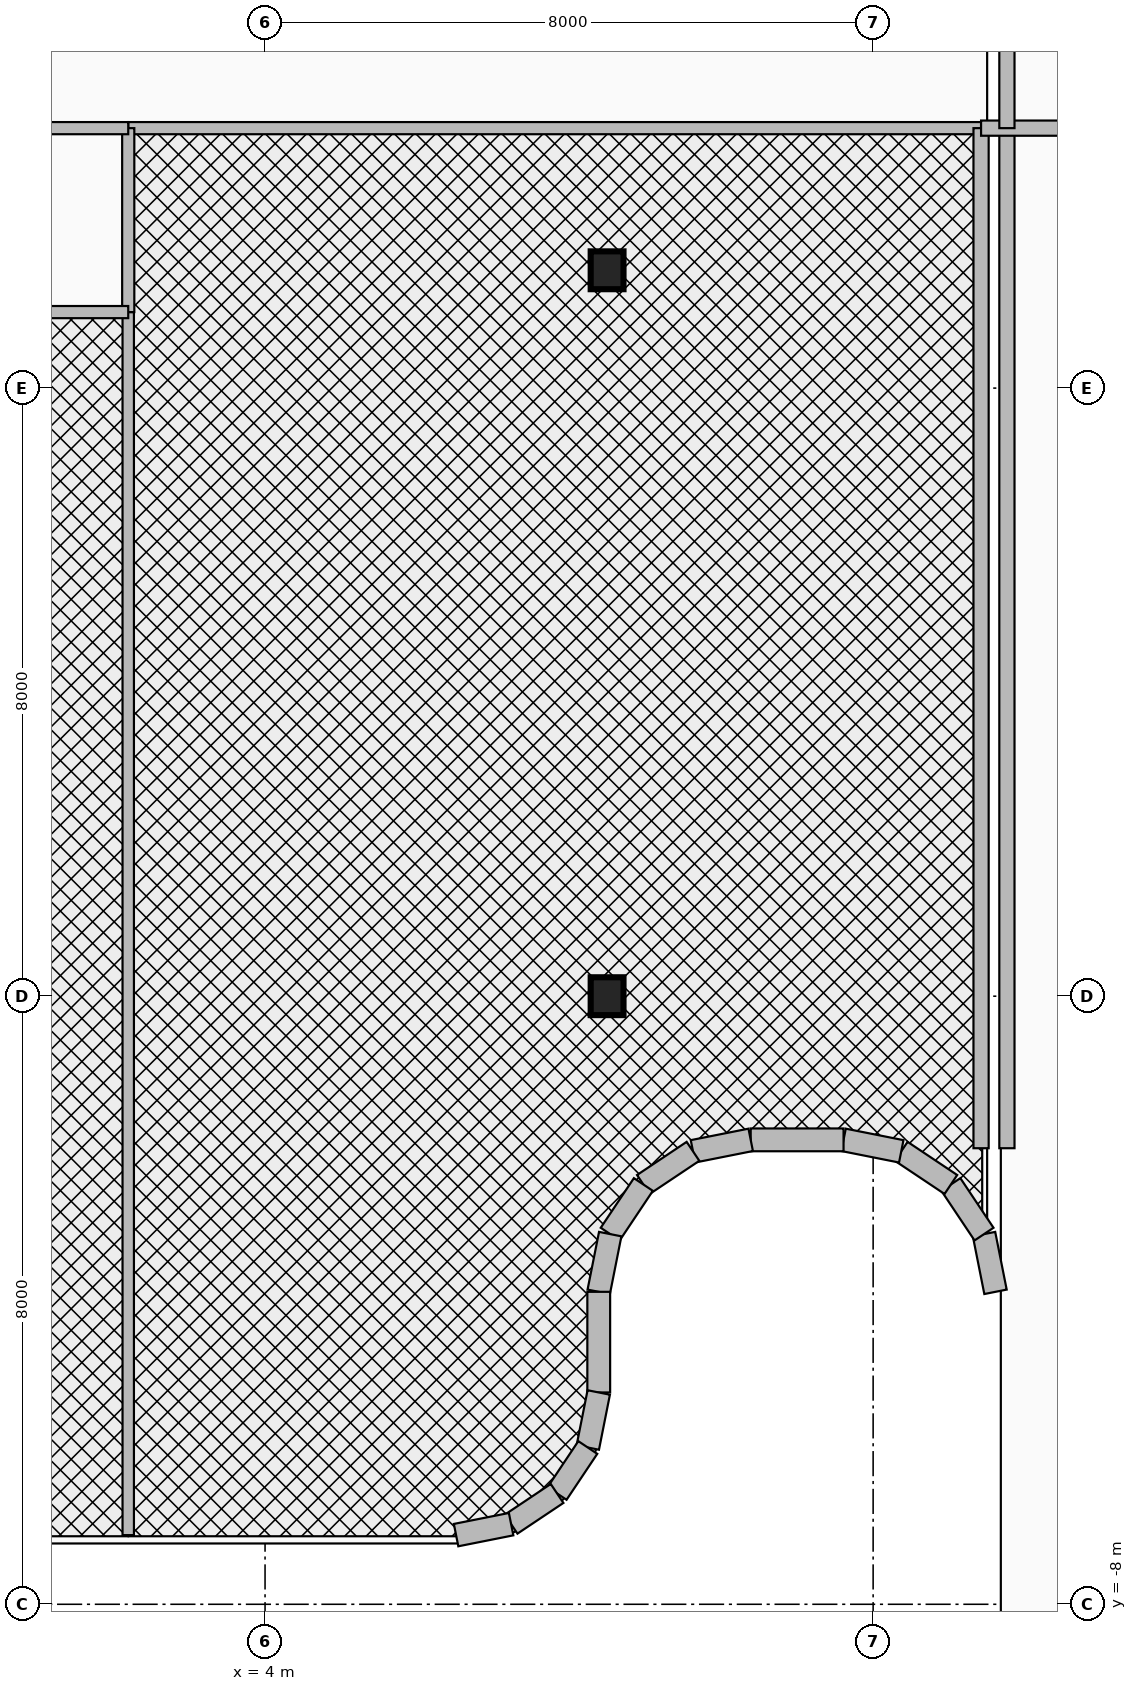
"""IFC4 building model, lengths in metres.
Left out: names, types, materials, properties, quantities, classifications, styles, units other than length and angle.
Written with IfcOpenShell. Run it as: python <this file> out.ifc"""

import sys

from ifc_helpers import new_model, si_unit, direction, frame, frame_2d, origin, origin_2d, place, context, subcontext, project, spatial, rectangle, i_section, extrude, source, transform, mapped, element, fill, save


model = new_model("IFC4")
c1 = context("Model", 3, precision=1e-05, world=origin(), true_north=direction((0.0, 1.0)))
c2 = subcontext(c1, "Body", "Model", "MODEL_VIEW")
j1 = project(units=[si_unit("LENGTHUNIT", "METRE"), si_unit("PLANEANGLEUNIT", "RADIAN")], contexts=[c1])
p1 = place(None, origin())
s1 = spatial("IfcSite", under=j1, at=p1, CompositionType="ELEMENT")
p2 = place(p1, origin())
s2 = spatial("IfcBuilding", under=s1, at=p2, CompositionType="ELEMENT")
p3 = place(p2, frame((0.0, 0.0, 180.5)))
s3 = spatial("IfcBuildingStorey", under=s2, at=p3, CompositionType="ELEMENT", Elevation=180.5)
m1 = source(origin(), c2, "Body", "SweptSolid", [
    extrude(i_section(OverallWidth=0.432, OverallDepth=0.498, WebThickness=0.056, FlangeThickness=0.089, at=origin_2d()), origin(), (0.0, 0.0, 1.0), 3.95),
])
for number, where, z_axis, x_axis in (
    (1, (8.5, 0.0, 0.0), (0.0, 0.0, 1.0), (1.0, 0.0, 0.0)),
    (2, (8.5, 9.55, 0.0), (0.0, 0.0, 1.0), (1.0, 0.0, 0.0)),
):
    element("IfcColumn", number, at=place(p3, frame(where, z_axis=z_axis, x_axis=x_axis)), inside=s3, PredefinedType="COLUMN", context=c2, shape_type="MappedRepresentation", body=[
        mapped(m1, transform((0.0, 0.0, 0.0), x_axis=(1.0, 0.0, 0.0), y_axis=(0.0, 1.0, 0.0), z_axis=(0.0, 0.0, 1.0), scale=1.0)),
    ])
p4 = place(p3, frame((13.61, -3.889, 0.0), z_axis=(0.0, 0.0, 1.0), x_axis=(-0.195206365311, 0.98076219082, 0.0)))
e3 = element("IfcWall", 3, at=p4, inside=s3, PredefinedType="SOLIDWALL", context=c2, shape_type="SweptSolid", body=[
    extrude(rectangle(XDim=0.774, YDim=0.3, at=frame_2d((0.387, 0.0))), origin(), (0.0, 0.0, 1.0), 3.63),
])
for number, where, z_axis, x_axis in (
    (4, (13.459, -3.13, 0.0), (0.0, 0.0, 1.0), (-0.556, 0.831, 0.0)),
    (5, (13.023, -2.477, 0.0), (0.0, 0.0, 1.0), (-0.831, 0.556, 0.0)),
):
    element("IfcWall", number, at=place(p3, frame(where, z_axis=z_axis, x_axis=x_axis)), inside=s3, PredefinedType="SOLIDWALL", context=c2, shape_type="SweptSolid", body=[
        extrude(rectangle(XDim=0.785, YDim=0.3, at=frame_2d((0.393, 0.0))), origin(), (0.0, 0.0, 1.0), 3.63),
    ])
p5 = place(p3, frame((12.37, -2.041, 0.0), z_axis=(0.0, 0.0, 1.0), x_axis=(-0.98076219082, 0.195206365311, 0.0)))
e6 = element("IfcWall", 6, at=p5, inside=s3, PredefinedType="SOLIDWALL", context=c2, shape_type="SweptSolid", body=[
    extrude(rectangle(XDim=0.774, YDim=0.3, at=frame_2d((0.387, 0.0))), origin(), (0.0, 0.0, 1.0), 3.63),
])
p6 = place(p3, frame((11.611, -1.89, 0.0), z_axis=(0.0, 0.0, 1.0), x_axis=(-1.0, 0.0, 0.0)))
e7 = element("IfcWall", 7, at=p6, inside=s3, PredefinedType="SOLIDWALL", context=c2, shape_type="SweptSolid", body=[
    extrude(rectangle(XDim=1.222, YDim=0.3, at=frame_2d((0.611, 0.0))), origin(), (0.0, 0.0, 1.0), 3.63),
])
p7 = place(p3, frame((10.389, -1.89, 0.0), z_axis=(0.0, 0.0, 1.0), x_axis=(-0.98076219082, -0.195206365311, 0.0)))
e8 = element("IfcWall", 8, at=p7, inside=s3, PredefinedType="SOLIDWALL", context=c2, shape_type="SweptSolid", body=[
    extrude(rectangle(XDim=0.774, YDim=0.3, at=frame_2d((0.387, 0.0))), origin(), (0.0, 0.0, 1.0), 3.63),
])
for number, where, z_axis, x_axis in (
    (9, (9.63, -2.041, 0.0), (0.0, 0.0, 1.0), (-0.831, -0.556, 0.0)),
    (10, (8.977, -2.477, 0.0), (0.0, 0.0, 1.0), (-0.556, -0.831, 0.0)),
):
    element("IfcWall", number, at=place(p3, frame(where, z_axis=z_axis, x_axis=x_axis)), inside=s3, PredefinedType="SOLIDWALL", context=c2, shape_type="SweptSolid", body=[
        extrude(rectangle(XDim=0.785, YDim=0.3, at=frame_2d((0.393, 0.0))), origin(), (0.0, 0.0, 1.0), 2.615),
    ])
p8 = place(p3, frame((8.541, -3.13, 0.0), z_axis=(0.0, 0.0, 1.0), x_axis=(-0.195206365311, -0.98076219082, 0.0)))
e11 = element("IfcWall", 11, at=p8, inside=s3, PredefinedType="SOLIDWALL", context=c2, shape_type="SweptSolid", body=[
    extrude(rectangle(XDim=0.774, YDim=0.3, at=frame_2d((0.387, 0.0))), origin(), (0.0, 0.0, 1.0), 2.615),
])
p9 = place(p3, frame((8.39, -3.889, 0.0), z_axis=(0.0, 0.0, 1.0), x_axis=(0.0, -1.0, 0.0)))
e12 = element("IfcWall", 12, at=p9, inside=s3, PredefinedType="SOLIDWALL", context=c2, shape_type="SweptSolid", body=[
    extrude(rectangle(XDim=1.324, YDim=0.3, at=frame_2d((0.662, 0.0))), origin(), (0.0, 0.0, 1.0), 2.615),
])
p10 = place(p3, frame((8.39, -5.213, 0.0), z_axis=(0.0, 0.0, 1.0), x_axis=(-0.194780446724, -0.980846867546, 0.0)))
e13 = element("IfcWall", 13, at=p10, inside=s3, PredefinedType="SOLIDWALL", context=c2, shape_type="SweptSolid", body=[
    extrude(rectangle(XDim=0.738, YDim=0.3, at=frame_2d((0.369, 0.0))), origin(), (0.0, 0.0, 1.0), 2.615),
])
p11 = place(p3, frame((8.246, -5.937, 0.0), z_axis=(0.0, 0.0, 1.0), x_axis=(-0.555784030735, -0.83132671747, 0.0)))
e14 = element("IfcWall", 14, at=p11, inside=s3, PredefinedType="SOLIDWALL", context=c2, shape_type="SweptSolid", body=[
    extrude(rectangle(XDim=0.728, YDim=0.3, at=frame_2d((0.364, 0.0))), origin(), (0.0, 0.0, 1.0), 2.615),
])
p12 = place(p3, frame((7.842, -6.542, 0.0), z_axis=(0.0, 0.0, 1.0), x_axis=(-0.831378135196, -0.555707113792, 0.0)))
e15 = element("IfcWall", 15, at=p12, inside=s3, PredefinedType="SOLIDWALL", context=c2, shape_type="SweptSolid", body=[
    extrude(rectangle(XDim=0.727, YDim=0.3, at=frame_2d((0.364, 0.0))), origin(), (0.0, 0.0, 1.0), 3.63),
])
p13 = place(p3, frame((7.237, -6.946, 0.0), z_axis=(0.0, 0.0, 1.0), x_axis=(-0.980783640462, -0.195098566376, 0.0)))
e16 = element("IfcWall", 16, at=p13, inside=s3, PredefinedType="SOLIDWALL", context=c2, shape_type="SweptSolid", body=[
    extrude(rectangle(XDim=0.738, YDim=0.3, at=frame_2d((0.369, 0.0))), origin(), (0.0, 0.0, 1.0), 3.076),
])
p14 = place(p3, frame((2.2, 11.42, 0.0), z_axis=(0.0, 0.0, 1.0), x_axis=(1.0, 0.0, 0.0)))
e17 = element("IfcWall", 17, at=p14, inside=s3, PredefinedType="PARTITIONING", context=c2, shape_type="SweptSolid", body=[
    extrude(rectangle(XDim=11.22, YDim=0.16, at=frame_2d((5.61, 0.0))), origin(), (0.0, 0.0, 1.0), 2.615),
])
p15 = place(p14, frame((4.0, 0.0, 0.0)))
e18 = element("IfcOpeningElement", 18, at=p15, cuts=e17, PredefinedType="OPENING", context=c2, shape_type="SweptSolid", body=[
    extrude(rectangle(XDim=1.8, YDim=2.15, at=frame_2d((0.9, 1.075))), frame((0.0, 0.095, 0.0), z_axis=(0.0, -1.0, 0.0), x_axis=(1.0, 0.0, 0.0)), (0.0, 0.0, 1.0), 0.19),
])
for number, where, z_axis, x_axis in (
    (19, (13.42, -2.0, 0.0), (0.0, 0.0, 1.0), (0.0, 1.0, 0.0)),
    (20, (13.76, -2.0, 0.0), (0.0, 0.0, 1.0), (0.0, 1.0, 0.0)),
):
    element("IfcWall", number, at=place(p3, frame(where, z_axis=z_axis, x_axis=x_axis)), inside=s3, PredefinedType="PARTITIONING", context=c2, shape_type="SweptSolid", body=[
        extrude(rectangle(XDim=13.42, YDim=0.2, at=frame_2d((6.71, 0.0))), origin(), (0.0, 0.0, 1.0), 2.665),
    ])
p16 = place(p3, frame((2.2, -7.09, 0.0), z_axis=(0.0, 0.0, 1.0), x_axis=(0.0, 1.0, 0.0)))
e21 = element("IfcWall", 21, at=p16, inside=s3, PredefinedType="PARTITIONING", context=c2, shape_type="SweptSolid", body=[
    extrude(rectangle(XDim=16.09, YDim=0.15, at=frame_2d((8.045, 0.0))), origin(), (0.0, 0.0, 1.0), 2.665),
])
p17 = place(p16, frame((11.5, 0.0, 0.0)))
e22 = element("IfcOpeningElement", 22, at=p17, cuts=e21, PredefinedType="OPENING", context=c2, shape_type="SweptSolid", body=[
    extrude(rectangle(XDim=0.9, YDim=2.1, at=frame_2d((0.45, 1.05))), frame((0.0, 0.09, 0.0), z_axis=(0.0, -1.0, 0.0), x_axis=(1.0, 0.0, 0.0)), (0.0, 0.0, 1.0), 0.18),
])
p18 = place(p3, frame((2.2, 9.0, 0.0), z_axis=(0.0, 0.0, 1.0), x_axis=(0.0, 1.0, 0.0)))
e23 = element("IfcWall", 23, at=p18, inside=s3, PredefinedType="PARTITIONING", context=c2, shape_type="SweptSolid", body=[
    extrude(rectangle(XDim=2.42, YDim=0.16, at=frame_2d((1.21, 0.0))), origin(), (0.0, 0.0, 1.0), 2.665),
])
p19 = place(p3, frame((-2.2, 9.0, 0.0), z_axis=(0.0, 0.0, 1.0), x_axis=(1.0, 0.0, 0.0)))
e24 = element("IfcWall", 24, at=p19, inside=s3, PredefinedType="PARTITIONING", context=c2, shape_type="SweptSolid", body=[
    extrude(rectangle(XDim=4.4, YDim=0.16, at=frame_2d((2.2, 0.0))), origin(), (0.0, 0.0, 1.0), 3.63),
])
p20 = place(p3, frame((-2.2, 11.42, 0.0), z_axis=(0.0, 0.0, 1.0), x_axis=(1.0, 0.0, 0.0)))
e25 = element("IfcWall", 25, at=p20, inside=s3, PredefinedType="PARTITIONING", context=c2, shape_type="SweptSolid", body=[
    extrude(rectangle(XDim=4.4, YDim=0.16, at=frame_2d((2.2, 0.0))), origin(), (0.0, 0.0, 1.0), 3.63),
])
p21 = place(p20, frame((0.3, 0.0, 0.0)))
e26 = element("IfcOpeningElement", 26, at=p21, cuts=e25, PredefinedType="OPENING", context=c2, shape_type="SweptSolid", body=[
    extrude(rectangle(XDim=0.85, YDim=2.1, at=frame_2d((0.425, 1.05))), frame((0.0, 0.095, 0.0), z_axis=(0.0, -1.0, 0.0), x_axis=(1.0, 0.0, 0.0)), (0.0, 0.0, 1.0), 0.19),
])
p22 = place(p20, frame((2.45, 0.0, 0.0)))
e27 = element("IfcOpeningElement", 27, at=p22, cuts=e25, PredefinedType="OPENING", context=c2, shape_type="SweptSolid", body=[
    extrude(rectangle(XDim=0.85, YDim=2.1, at=frame_2d((0.425, 1.05))), frame((0.0, 0.095, 0.0), z_axis=(0.0, -1.0, 0.0), x_axis=(1.0, 0.0, 0.0)), (0.0, 0.0, 1.0), 0.19),
])
p23 = place(p3, frame((13.42, 11.42, 0.0), z_axis=(0.0, 0.0, 1.0), x_axis=(1.0, 0.0, 0.0)))
e28 = element("IfcWall", 28, at=p23, inside=s3, PredefinedType="PARTITIONING", context=c2, shape_type="SweptSolid", body=[
    extrude(rectangle(XDim=1.98, YDim=0.2, at=frame_2d((0.99, 0.0))), origin(), (0.0, 0.0, 1.0), 3.004),
])
p24 = place(p3, frame((13.76, 11.42, 0.0), z_axis=(0.0, 0.0, 1.0), x_axis=(0.0, 1.0, 0.0)))
e29 = element("IfcWall", 29, at=p24, inside=s3, PredefinedType="PARTITIONING", context=c2, shape_type="SweptSolid", body=[
    extrude(rectangle(XDim=1.5, YDim=0.2, at=frame_2d((0.75, 0.0))), origin(), (0.0, 0.0, 1.0), 3.004),
])
p25 = place(p24, frame((0.225, 0.0, 0.0)))
e30 = element("IfcOpeningElement", 30, at=p25, cuts=e29, PredefinedType="OPENING", context=c2, shape_type="SweptSolid", body=[
    extrude(rectangle(XDim=1.05, YDim=2.15, at=frame_2d((0.525, 1.075))), frame((0.0, 0.115, 0.0), z_axis=(0.0, -1.0, 0.0), x_axis=(1.0, 0.0, 0.0)), (0.0, 0.0, 1.0), 0.23),
])
p26 = place(p15, origin())
e31 = element("IfcDoor", 31, at=p26, inside=s3, OperationType="DOUBLE_DOOR_SINGLE_SWING", PredefinedType="DOOR", context=c2, shape_type="SweptSolid", body=[
    extrude(rectangle(XDim=1.8, YDim=2.15, at=frame_2d((0.9, 1.075))), frame((0.0, 0.025, 0.0), z_axis=(0.0, -1.0, 0.0), x_axis=(1.0, 0.0, 0.0)), (0.0, 0.0, 1.0), 0.05),
])
fill(e18, e31)
p27 = place(p17, frame((0.9, 0.0, 0.0), z_axis=(0.0, 0.0, 1.0), x_axis=(-1.0, 0.0, 0.0)))
e32 = element("IfcDoor", 32, at=p27, inside=s3, OperationType="SINGLE_SWING_LEFT", PredefinedType="DOOR", context=c2, shape_type="SweptSolid", body=[
    extrude(rectangle(XDim=0.9, YDim=2.1, at=frame_2d((0.45, 1.05))), frame((0.0, 0.025, 0.0), z_axis=(0.0, -1.0, 0.0), x_axis=(1.0, 0.0, 0.0)), (0.0, 0.0, 1.0), 0.05),
])
fill(e22, e32)
p28 = place(p25, origin())
e33 = element("IfcDoor", 33, at=p28, inside=s3, OperationType="SINGLE_SWING_RIGHT", PredefinedType="DOOR", context=c2, shape_type="SweptSolid", body=[
    extrude(rectangle(XDim=1.05, YDim=2.15, at=frame_2d((0.525, 1.075))), frame((0.0, 0.025, 0.0), z_axis=(0.0, -1.0, 0.0), x_axis=(1.0, 0.0, 0.0)), (0.0, 0.0, 1.0), 0.05),
])
fill(e30, e33)
save(model, sys.argv[1])
